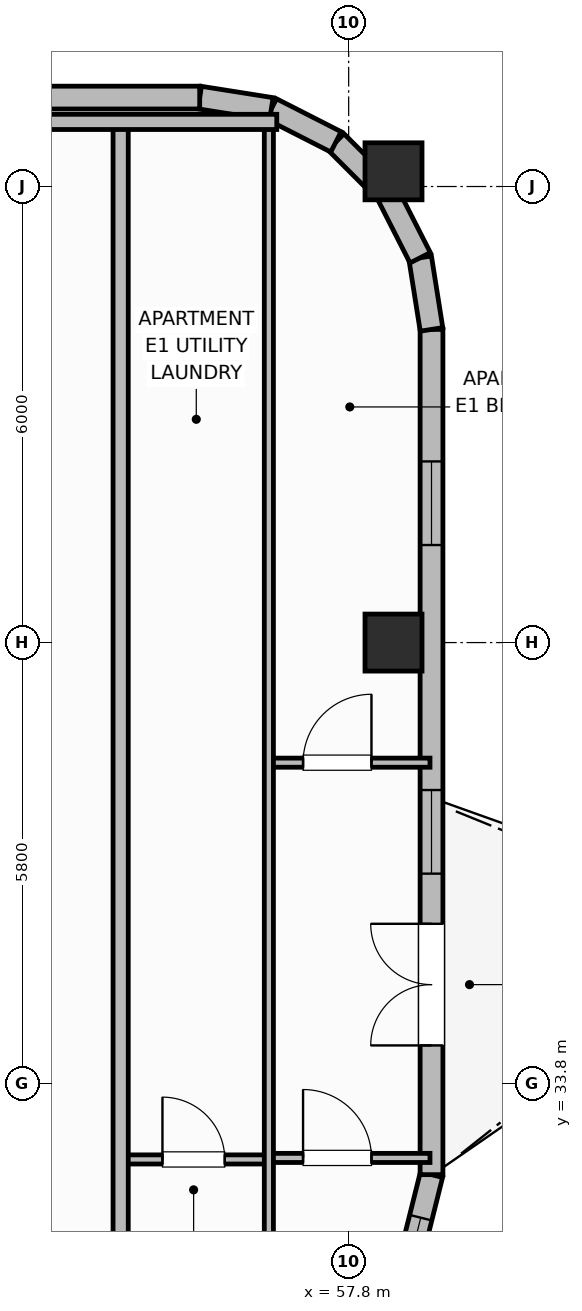
"""IFC4 building model, lengths in metres.
Left out: names, types, materials, properties, quantities, classifications, styles, units other than length and angle.
Written with IfcOpenShell. Run it as: python <this file> out.ifc"""

import sys

from ifc_helpers import new_model, si_unit, direction, frame, frame_2d, origin, origin_2d, place, context, subcontext, project, spatial, rectangle, extrude, element, fill, save


model = new_model("IFC4")
c1 = context("Model", 3, precision=1e-05, world=origin(), true_north=direction((0.0, 1.0)))
c2 = subcontext(c1, "Body", "Model", "MODEL_VIEW")
j1 = project(units=[si_unit("LENGTHUNIT", "METRE"), si_unit("PLANEANGLEUNIT", "RADIAN")], contexts=[c1])
p1 = place(None, origin())
s1 = spatial("IfcSite", under=j1, at=p1, CompositionType="ELEMENT")
p2 = place(p1, origin())
s2 = spatial("IfcBuilding", under=s1, at=p2, CompositionType="ELEMENT")
p3 = place(p2, frame((0.0, 0.0, 263.9)))
s3 = spatial("IfcBuildingStorey", under=s2, at=p3, CompositionType="ELEMENT", Elevation=263.9)
for number, where, z_axis, x_axis in (
    (1, (58.39, 39.6, 0.0), (0.0, 0.0, 1.0), (1.0, 0.0, 0.0)),
    (2, (58.39, 45.8, 0.0), (0.0, 0.0, 1.0), (1.0, 0.0, 0.0)),
):
    element("IfcColumn", number, at=place(p3, frame(where, z_axis=z_axis, x_axis=x_axis)), inside=s3, PredefinedType="COLUMN", context=c2, shape_type="SweptSolid", body=[
        extrude(rectangle(XDim=0.75, YDim=0.75, at=origin_2d()), origin(), (0.0, 0.0, 1.0), 3.7),
    ])
p4 = place(p3, frame((58.34, 30.4, 0.0), z_axis=(0.0, 0.0, 1.0), x_axis=(0.242434303349, 0.970167824946, 0.0)))
e3 = element("IfcWall", 3, at=p4, inside=s3, PredefinedType="SOLIDWALL", context=c2, shape_type="SweptSolid", body=[
    extrude(rectangle(XDim=2.268, YDim=0.3, at=frame_2d((1.134, 0.0))), origin(), (0.0, 0.0, 1.0), 2.73),
])
p5 = place(p4, frame((0.584, 0.0, 0.92)))
e4 = element("IfcOpeningElement", 4, at=p5, cuts=e3, PredefinedType="OPENING", context=c2, shape_type="SweptSolid", body=[
    extrude(rectangle(XDim=1.1, YDim=1.65, at=frame_2d((0.55, 0.825))), frame((0.0, 0.16, 0.0), z_axis=(0.0, -1.0, 0.0), x_axis=(1.0, 0.0, 0.0)), (0.0, 0.0, 1.0), 0.32),
])
p6 = place(p3, frame((58.89, 32.6, 0.0), z_axis=(0.0, 0.0, 1.0), x_axis=(0.0, 1.0, 0.0)))
e5 = element("IfcWall", 5, at=p6, inside=s3, PredefinedType="SOLIDWALL", context=c2, shape_type="SweptSolid", body=[
    extrude(rectangle(XDim=11.12, YDim=0.3, at=frame_2d((5.56, 0.0))), origin(), (0.0, 0.0, 1.0), 2.73),
])
p7 = place(p6, frame((1.7, 0.0, 0.0)))
e6 = element("IfcOpeningElement", 6, at=p7, cuts=e5, PredefinedType="OPENING", context=c2, shape_type="SweptSolid", body=[
    extrude(rectangle(XDim=1.6, YDim=2.1, at=frame_2d((0.8, 1.05))), frame((0.0, 0.16, 0.0), z_axis=(0.0, -1.0, 0.0), x_axis=(1.0, 0.0, 0.0)), (0.0, 0.0, 1.0), 0.32),
])
p8 = place(p6, frame((3.96, 0.0, 0.95)))
e7 = element("IfcOpeningElement", 7, at=p8, cuts=e5, PredefinedType="OPENING", context=c2, shape_type="SweptSolid", body=[
    extrude(rectangle(XDim=1.1, YDim=1.65, at=frame_2d((0.55, 0.825))), frame((0.0, 0.16, 0.0), z_axis=(0.0, -1.0, 0.0), x_axis=(1.0, 0.0, 0.0)), (0.0, 0.0, 1.0), 0.32),
])
p9 = place(p6, frame((8.283, 0.0, 0.95)))
e8 = element("IfcOpeningElement", 8, at=p9, cuts=e5, PredefinedType="OPENING", context=c2, shape_type="SweptSolid", body=[
    extrude(rectangle(XDim=1.1, YDim=1.65, at=frame_2d((0.55, 0.825))), frame((0.0, 0.16, 0.0), z_axis=(0.0, -1.0, 0.0), x_axis=(1.0, 0.0, 0.0)), (0.0, 0.0, 1.0), 0.32),
])
p10 = place(p3, frame((58.89, 43.72, 0.0), z_axis=(0.0, 0.0, 1.0), x_axis=(-0.156304114255, 0.987708977314, 0.0)))
e9 = element("IfcWall", 9, at=p10, inside=s3, PredefinedType="SOLIDWALL", context=c2, shape_type="SweptSolid", body=[
    extrude(rectangle(XDim=0.954, YDim=0.3, at=frame_2d((0.477, 0.0))), origin(), (0.0, 0.0, 1.0), 2.73),
])
p11 = place(p3, frame((58.741, 44.663, 0.0), z_axis=(0.0, 0.0, 1.0), x_axis=(-0.45395644796, 0.891023873617, 0.0)))
e10 = element("IfcWall", 10, at=p11, inside=s3, PredefinedType="SOLIDWALL", context=c2, shape_type="SweptSolid", body=[
    extrude(rectangle(XDim=0.954, YDim=0.3, at=frame_2d((0.477, 0.0))), origin(), (0.0, 0.0, 1.0), 2.73),
])
for number, where, z_axis, x_axis in (
    (11, (58.308, 45.513, 0.0), (0.0, 0.0, 1.0), (-0.707, 0.707, 0.0)),
    (12, (57.633, 46.188, 0.0), (0.0, 0.0, 1.0), (-0.891, 0.454, 0.0)),
):
    element("IfcWall", number, at=place(p3, frame(where, z_axis=z_axis, x_axis=x_axis)), inside=s3, PredefinedType="SOLIDWALL", context=c2, shape_type="SweptSolid", body=[
        extrude(rectangle(XDim=0.954, YDim=0.3, at=frame_2d((0.477, 0.0))), origin(), (0.0, 0.0, 1.0), 2.73),
    ])
p12 = place(p3, frame((56.782, 46.621, 0.0), z_axis=(0.0, 0.0, 1.0), x_axis=(-0.987663181641, 0.156593229835, 0.0)))
e13 = element("IfcWall", 13, at=p12, inside=s3, PredefinedType="SOLIDWALL", context=c2, shape_type="SweptSolid", body=[
    extrude(rectangle(XDim=0.954, YDim=0.3, at=frame_2d((0.477, 0.0))), origin(), (0.0, 0.0, 1.0), 2.73),
])
p13 = place(p3, frame((55.84, 46.77, 0.0), z_axis=(0.0, 0.0, 1.0), x_axis=(-1.0, 0.0, 0.0)))
e14 = element("IfcWall", 14, at=p13, inside=s3, PredefinedType="SOLIDWALL", context=c2, shape_type="SweptSolid", body=[
    extrude(rectangle(XDim=33.28, YDim=0.3, at=frame_2d((16.64, 0.0))), origin(), (0.0, 0.0, 1.0), 2.73),
])
p14 = place(p13, frame((5.596, 0.0, 0.71)))
e15 = element("IfcOpeningElement", 15, at=p14, cuts=e14, PredefinedType="OPENING", context=c2, shape_type="SweptSolid", body=[
    extrude(rectangle(XDim=2.1, YDim=1.9, at=frame_2d((1.05, 0.95))), frame((0.0, 0.16, 0.0), z_axis=(0.0, -1.0, 0.0), x_axis=(1.0, 0.0, 0.0)), (0.0, 0.0, 1.0), 0.32),
])
p15 = place(p13, frame((9.244, 0.0, 0.71)))
e16 = element("IfcOpeningElement", 16, at=p15, cuts=e14, PredefinedType="OPENING", context=c2, shape_type="SweptSolid", body=[
    extrude(rectangle(XDim=2.1, YDim=1.9, at=frame_2d((1.05, 0.95))), frame((0.0, 0.16, 0.0), z_axis=(0.0, -1.0, 0.0), x_axis=(1.0, 0.0, 0.0)), (0.0, 0.0, 1.0), 0.32),
])
p16 = place(p13, frame((13.941, 0.0, 0.71)))
e17 = element("IfcOpeningElement", 17, at=p16, cuts=e14, PredefinedType="OPENING", context=c2, shape_type="SweptSolid", body=[
    extrude(rectangle(XDim=2.1, YDim=1.9, at=frame_2d((1.05, 0.95))), frame((0.0, 0.16, 0.0), z_axis=(0.0, -1.0, 0.0), x_axis=(1.0, 0.0, 0.0)), (0.0, 0.0, 1.0), 0.32),
])
p17 = place(p13, frame((17.239, 0.0, 0.71)))
e18 = element("IfcOpeningElement", 18, at=p17, cuts=e14, PredefinedType="OPENING", context=c2, shape_type="SweptSolid", body=[
    extrude(rectangle(XDim=2.1, YDim=1.9, at=frame_2d((1.05, 0.95))), frame((0.0, 0.16, 0.0), z_axis=(0.0, -1.0, 0.0), x_axis=(1.0, 0.0, 0.0)), (0.0, 0.0, 1.0), 0.32),
])
p18 = place(p13, frame((21.936, 0.0, 0.71)))
e19 = element("IfcOpeningElement", 19, at=p18, cuts=e14, PredefinedType="OPENING", context=c2, shape_type="SweptSolid", body=[
    extrude(rectangle(XDim=2.1, YDim=1.9, at=frame_2d((1.05, 0.95))), frame((0.0, 0.16, 0.0), z_axis=(0.0, -1.0, 0.0), x_axis=(1.0, 0.0, 0.0)), (0.0, 0.0, 1.0), 0.32),
])
p19 = place(p13, frame((25.584, 0.0, 0.71)))
e20 = element("IfcOpeningElement", 20, at=p19, cuts=e14, PredefinedType="OPENING", context=c2, shape_type="SweptSolid", body=[
    extrude(rectangle(XDim=2.1, YDim=1.9, at=frame_2d((1.05, 0.95))), frame((0.0, 0.16, 0.0), z_axis=(0.0, -1.0, 0.0), x_axis=(1.0, 0.0, 0.0)), (0.0, 0.0, 1.0), 0.32),
])
p20 = place(p3, frame((54.8, 32.8, 0.0), z_axis=(0.0, 0.0, 1.0), x_axis=(1.0, 0.0, 0.0)))
e21 = element("IfcWall", 21, at=p20, inside=s3, PredefinedType="PARTITIONING", context=c2, shape_type="SweptSolid", body=[
    extrude(rectangle(XDim=1.95, YDim=0.12, at=frame_2d((0.975, 0.0))), origin(), (0.0, 0.0, 1.0), 2.56),
])
p21 = place(p20, frame((0.55, 0.0, 0.0)))
e22 = element("IfcOpeningElement", 22, at=p21, cuts=e21, PredefinedType="OPENING", context=c2, shape_type="SweptSolid", body=[
    extrude(rectangle(XDim=0.82, YDim=2.08, at=frame_2d((0.41, 1.04))), frame((0.0, 0.07, 0.0), z_axis=(0.0, -1.0, 0.0), x_axis=(1.0, 0.0, 0.0)), (0.0, 0.0, 1.0), 0.14),
])
p22 = place(p3, frame((56.75, 32.82, 0.0), z_axis=(0.0, 0.0, 1.0), x_axis=(1.0, 0.0, 0.0)))
e23 = element("IfcWall", 23, at=p22, inside=s3, PredefinedType="PARTITIONING", context=c2, shape_type="SweptSolid", body=[
    extrude(rectangle(XDim=2.12, YDim=0.12, at=frame_2d((1.06, 0.0))), origin(), (0.0, 0.0, 1.0), 2.56),
])
p23 = place(p22, frame((0.45, 0.0, 0.0)))
e24 = element("IfcOpeningElement", 24, at=p23, cuts=e23, PredefinedType="OPENING", context=c2, shape_type="SweptSolid", body=[
    extrude(rectangle(XDim=0.9, YDim=2.1, at=frame_2d((0.45, 1.05))), frame((0.0, 0.07, 0.0), z_axis=(0.0, -1.0, 0.0), x_axis=(1.0, 0.0, 0.0)), (0.0, 0.0, 1.0), 0.14),
])
p24 = place(p3, frame((56.75, 38.02, 0.0), z_axis=(0.0, 0.0, 1.0), x_axis=(1.0, 0.0, 0.0)))
e25 = element("IfcWall", 25, at=p24, inside=s3, PredefinedType="PARTITIONING", context=c2, shape_type="SweptSolid", body=[
    extrude(rectangle(XDim=2.12, YDim=0.12, at=frame_2d((1.06, 0.0))), origin(), (0.0, 0.0, 1.0), 2.56),
])
p25 = place(p24, frame((0.45, 0.0, 0.0)))
e26 = element("IfcOpeningElement", 26, at=p25, cuts=e25, PredefinedType="OPENING", context=c2, shape_type="SweptSolid", body=[
    extrude(rectangle(XDim=0.9, YDim=2.1, at=frame_2d((0.45, 1.05))), frame((0.0, 0.07, 0.0), z_axis=(0.0, -1.0, 0.0), x_axis=(1.0, 0.0, 0.0)), (0.0, 0.0, 1.0), 0.14),
])
p26 = place(p3, frame((56.75, 9.99, 0.0), z_axis=(0.0, 0.0, 1.0), x_axis=(0.0, 1.0, 0.0)))
e27 = element("IfcWall", 27, at=p26, inside=s3, PredefinedType="PARTITIONING", context=c2, shape_type="SweptSolid", body=[
    extrude(rectangle(XDim=36.42, YDim=0.12, at=frame_2d((18.21, 0.0))), origin(), (0.0, 0.0, 1.0), 2.56),
])
p27 = place(p26, frame((0.41, 0.0, 0.0)))
e28 = element("IfcOpeningElement", 28, at=p27, cuts=e27, PredefinedType="OPENING", context=c2, shape_type="SweptSolid", body=[
    extrude(rectangle(XDim=0.9, YDim=2.1, at=frame_2d((0.45, 1.05))), frame((0.0, 0.07, 0.0), z_axis=(0.0, -1.0, 0.0), x_axis=(1.0, 0.0, 0.0)), (0.0, 0.0, 1.0), 0.14),
])
p28 = place(p26, frame((15.56, 0.0, 0.0)))
e29 = element("IfcOpeningElement", 29, at=p28, cuts=e27, PredefinedType="OPENING", context=c2, shape_type="SweptSolid", body=[
    extrude(rectangle(XDim=0.82, YDim=2.08, at=frame_2d((0.41, 1.04))), frame((0.0, 0.07, 0.0), z_axis=(0.0, -1.0, 0.0), x_axis=(1.0, 0.0, 0.0)), (0.0, 0.0, 1.0), 0.14),
])
p29 = place(p3, frame((54.8, 9.95, 0.0), z_axis=(0.0, 0.0, 1.0), x_axis=(0.0, 1.0, 0.0)))
e30 = element("IfcWall", 30, at=p29, inside=s3, PredefinedType="PARTITIONING", context=c2, shape_type="SweptSolid", body=[
    extrude(rectangle(XDim=36.5, YDim=0.2, at=frame_2d((18.25, 0.0))), origin(), (0.0, 0.0, 1.0), 2.56),
])
p30 = place(p29, frame((3.25, 0.0, 0.0)))
e31 = element("IfcOpeningElement", 31, at=p30, cuts=e30, PredefinedType="OPENING", context=c2, shape_type="SweptSolid", body=[
    extrude(rectangle(XDim=1.0, YDim=2.15, at=frame_2d((0.5, 1.075))), frame((0.0, 0.11, 0.0), z_axis=(0.0, -1.0, 0.0), x_axis=(1.0, 0.0, 0.0)), (0.0, 0.0, 1.0), 0.22),
])
p31 = place(p3, frame((53.1, 46.45, 0.0), z_axis=(0.0, 0.0, 1.0), x_axis=(1.0, 0.0, 0.0)))
e32 = element("IfcWall", 32, at=p31, inside=s3, PredefinedType="PARTITIONING", context=c2, shape_type="SweptSolid", body=[
    extrude(rectangle(XDim=3.754, YDim=0.2, at=frame_2d((1.877, 0.0))), origin(), (0.0, 0.0, 1.0), 2.56),
])
p32 = place(p5, origin())
e33 = element("IfcWindow", 33, at=p32, inside=s3, PartitioningType="SINGLE_PANEL", PredefinedType="WINDOW", context=c2, shape_type="SweptSolid", body=[
    extrude(rectangle(XDim=1.1, YDim=1.65, at=frame_2d((0.55, 0.825))), frame((0.0, 0.03, 0.0), z_axis=(0.0, -1.0, 0.0), x_axis=(1.0, 0.0, 0.0)), (0.0, 0.0, 1.0), 0.06),
])
fill(e4, e33)
p33 = place(p7, origin())
e34 = element("IfcDoor", 34, at=p33, inside=s3, OperationType="DOUBLE_DOOR_SINGLE_SWING", PredefinedType="DOOR", context=c2, shape_type="SweptSolid", body=[
    extrude(rectangle(XDim=1.6, YDim=2.1, at=frame_2d((0.8, 1.05))), frame((0.0, 0.025, 0.0), z_axis=(0.0, -1.0, 0.0), x_axis=(1.0, 0.0, 0.0)), (0.0, 0.0, 1.0), 0.05),
])
fill(e6, e34)
p34 = place(p8, origin())
e35 = element("IfcWindow", 35, at=p34, inside=s3, PartitioningType="SINGLE_PANEL", PredefinedType="WINDOW", context=c2, shape_type="SweptSolid", body=[
    extrude(rectangle(XDim=1.1, YDim=1.65, at=frame_2d((0.55, 0.825))), frame((0.0, 0.03, 0.0), z_axis=(0.0, -1.0, 0.0), x_axis=(1.0, 0.0, 0.0)), (0.0, 0.0, 1.0), 0.06),
])
fill(e7, e35)
p35 = place(p9, origin())
e36 = element("IfcWindow", 36, at=p35, inside=s3, PartitioningType="SINGLE_PANEL", PredefinedType="WINDOW", context=c2, shape_type="SweptSolid", body=[
    extrude(rectangle(XDim=1.1, YDim=1.65, at=frame_2d((0.55, 0.825))), frame((0.0, 0.03, 0.0), z_axis=(0.0, -1.0, 0.0), x_axis=(1.0, 0.0, 0.0)), (0.0, 0.0, 1.0), 0.06),
])
fill(e8, e36)
p36 = place(p21, origin())
e37 = element("IfcDoor", 37, at=p36, inside=s3, OperationType="SINGLE_SWING_LEFT", PredefinedType="DOOR", context=c2, shape_type="SweptSolid", body=[
    extrude(rectangle(XDim=0.82, YDim=2.08, at=frame_2d((0.41, 1.04))), frame((0.0, 0.025, 0.0), z_axis=(0.0, -1.0, 0.0), x_axis=(1.0, 0.0, 0.0)), (0.0, 0.0, 1.0), 0.05),
])
fill(e22, e37)
p37 = place(p23, origin())
e38 = element("IfcDoor", 38, at=p37, inside=s3, OperationType="SINGLE_SWING_LEFT", PredefinedType="DOOR", context=c2, shape_type="SweptSolid", body=[
    extrude(rectangle(XDim=0.9, YDim=2.1, at=frame_2d((0.45, 1.05))), frame((0.0, 0.025, 0.0), z_axis=(0.0, -1.0, 0.0), x_axis=(1.0, 0.0, 0.0)), (0.0, 0.0, 1.0), 0.05),
])
fill(e24, e38)
p38 = place(p25, origin())
e39 = element("IfcDoor", 39, at=p38, inside=s3, OperationType="SINGLE_SWING_RIGHT", PredefinedType="DOOR", context=c2, shape_type="SweptSolid", body=[
    extrude(rectangle(XDim=0.9, YDim=2.1, at=frame_2d((0.45, 1.05))), frame((0.0, 0.025, 0.0), z_axis=(0.0, -1.0, 0.0), x_axis=(1.0, 0.0, 0.0)), (0.0, 0.0, 1.0), 0.05),
])
fill(e26, e39)
save(model, sys.argv[1])
